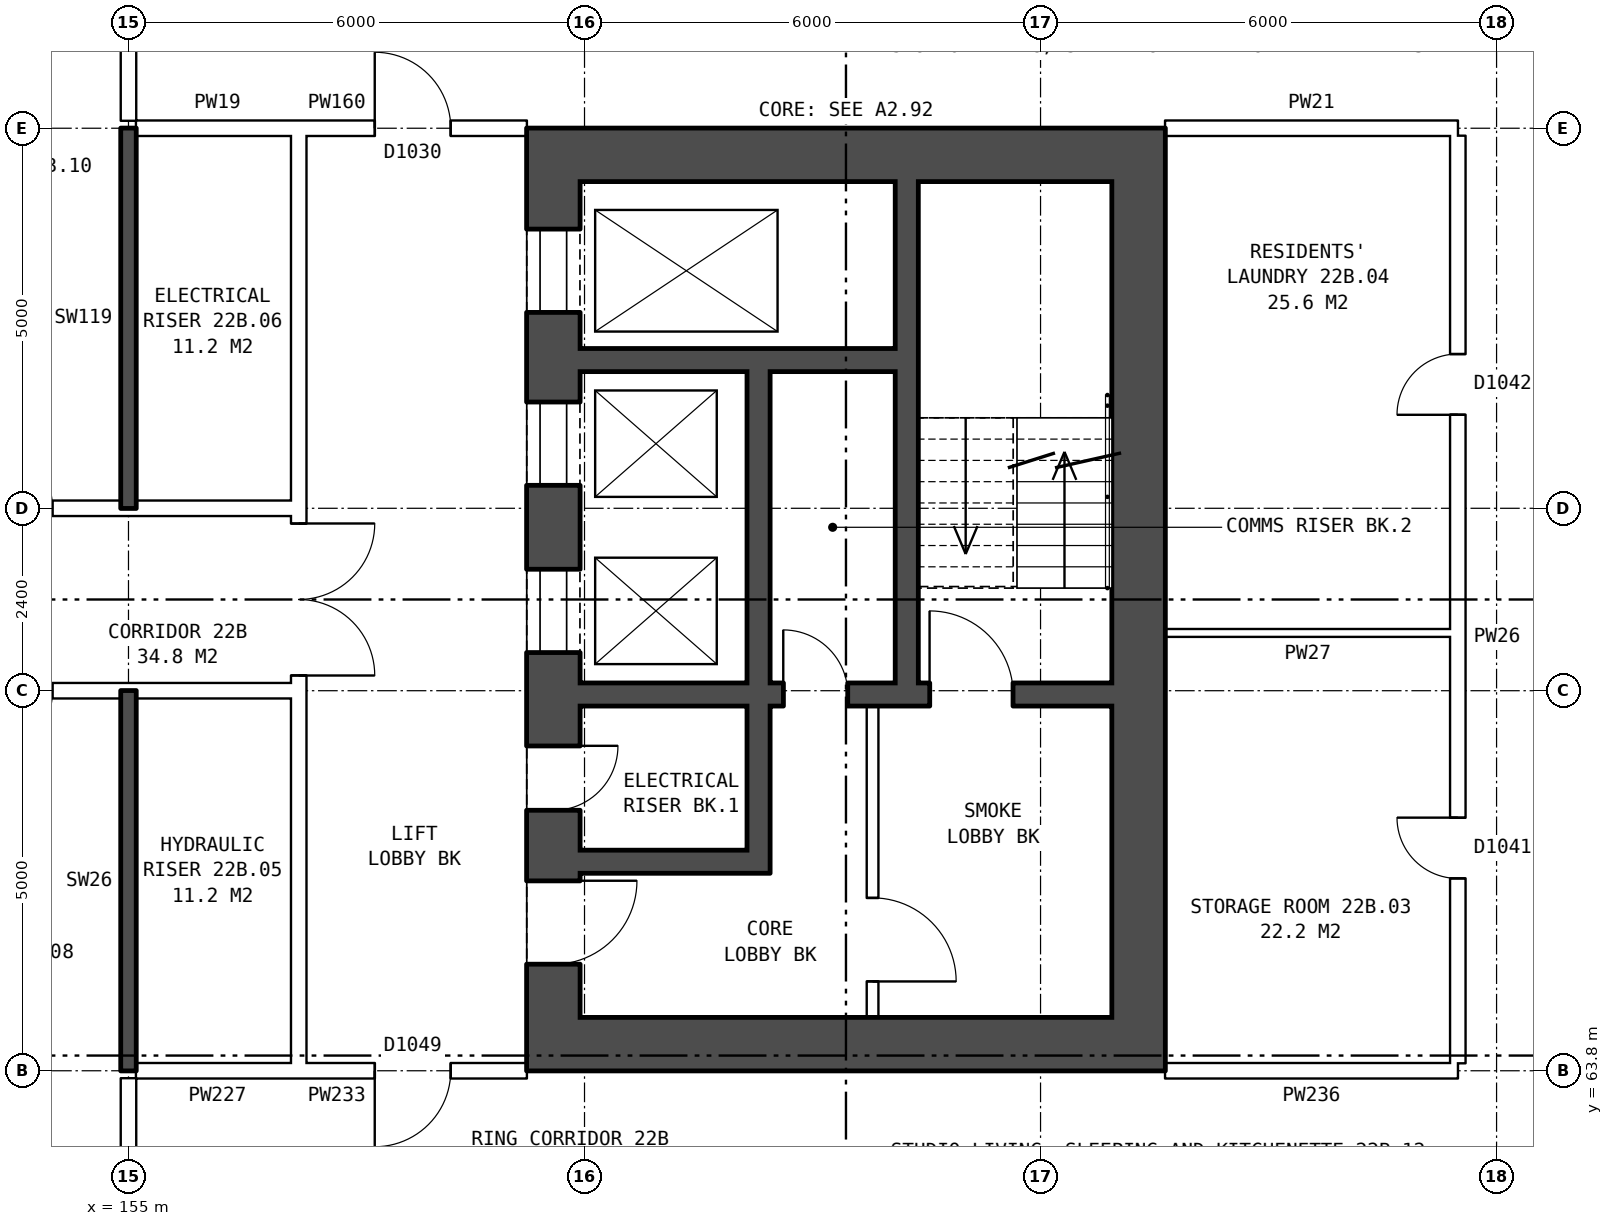
"""IFC4 building model, lengths in metres.
Left out: names, types, materials, properties, quantities, classifications, styles, units other than length and angle.
Written with IfcOpenShell. Run it as: python <this file> out.ifc"""

import sys

from ifc_helpers import new_model, si_unit, direction, frame, frame_2d, origin, place, context, subcontext, project, spatial, rectangle, extrude, element, fill, save


model = new_model("IFC4")
c1 = context("Model", 3, precision=1e-05, world=origin(), true_north=direction((0.0, 1.0)))
c2 = subcontext(c1, "Body", "Model", "MODEL_VIEW")
j1 = project(units=[si_unit("LENGTHUNIT", "METRE"), si_unit("PLANEANGLEUNIT", "RADIAN")], contexts=[c1])
p1 = place(None, origin())
s1 = spatial("IfcSite", under=j1, at=p1, CompositionType="ELEMENT")
p2 = place(p1, origin())
s2 = spatial("IfcBuilding", under=s1, at=p2, CompositionType="ELEMENT")
p3 = place(p2, frame((0.0, 0.0, 80.9)))
s3 = spatial("IfcBuildingStorey", under=s2, at=p3, CompositionType="ELEMENT", Elevation=80.9)
p4 = place(p3, frame((160.59, 75.5, 0.0), z_axis=(0.0, 0.0, 1.0), x_axis=(0.0, -1.0, 0.0)))
e1 = element("IfcWall", 1, at=p4, inside=s3, PredefinedType="SHEAR", context=c2, shape_type="SweptSolid", body=[
    extrude(rectangle(XDim=11.0, YDim=0.7, at=frame_2d((5.5, 0.0))), origin(), (0.0, 0.0, 1.0), 2.85),
])
p5 = place(p4, frame((0.625, 0.0, 0.0)))
e2 = element("IfcOpeningElement", 2, at=p5, cuts=e1, PredefinedType="OPENING", context=c2, shape_type="SweptSolid", body=[
    extrude(rectangle(XDim=1.1, YDim=2.1, at=frame_2d((0.55, 1.05))), frame((0.0, 0.36, 0.0), z_axis=(0.0, -1.0, 0.0), x_axis=(1.0, 0.0, 0.0)), (0.0, 0.0, 1.0), 0.72),
])
p6 = place(p4, frame((2.9, 0.0, 0.0)))
e3 = element("IfcOpeningElement", 3, at=p6, cuts=e1, PredefinedType="OPENING", context=c2, shape_type="SweptSolid", body=[
    extrude(rectangle(XDim=1.1, YDim=2.1, at=frame_2d((0.55, 1.05))), frame((0.0, 0.36, 0.0), z_axis=(0.0, -1.0, 0.0), x_axis=(1.0, 0.0, 0.0)), (0.0, 0.0, 1.0), 0.72),
])
p7 = place(p4, frame((5.1, 0.0, 0.0)))
e4 = element("IfcOpeningElement", 4, at=p7, cuts=e1, PredefinedType="OPENING", context=c2, shape_type="SweptSolid", body=[
    extrude(rectangle(XDim=1.1, YDim=2.1, at=frame_2d((0.55, 1.05))), frame((0.0, 0.36, 0.0), z_axis=(0.0, -1.0, 0.0), x_axis=(1.0, 0.0, 0.0)), (0.0, 0.0, 1.0), 0.72),
])
p8 = place(p4, frame((9.2, 0.0, 0.0)))
e5 = element("IfcOpeningElement", 5, at=p8, cuts=e1, PredefinedType="OPENING", context=c2, shape_type="SweptSolid", body=[
    extrude(rectangle(XDim=1.1, YDim=2.1, at=frame_2d((0.55, 1.05))), frame((0.0, 0.36, 0.0), z_axis=(0.0, -1.0, 0.0), x_axis=(1.0, 0.0, 0.0)), (0.0, 0.0, 1.0), 0.72),
])
p9 = place(p4, frame((7.425, 0.0, 0.0)))
e6 = element("IfcOpeningElement", 6, at=p9, cuts=e1, PredefinedType="OPENING", context=c2, shape_type="SweptSolid", body=[
    extrude(rectangle(XDim=0.85, YDim=2.1, at=frame_2d((0.425, 1.05))), frame((0.0, 0.36, 0.0), z_axis=(0.0, -1.0, 0.0), x_axis=(1.0, 0.0, 0.0)), (0.0, 0.0, 1.0), 0.72),
])
p10 = place(p3, frame((168.29, 75.5, 0.0), z_axis=(0.0, 0.0, 1.0), x_axis=(0.0, -1.0, 0.0)))
e7 = element("IfcWall", 7, at=p10, inside=s3, PredefinedType="SHEAR", context=c2, shape_type="SweptSolid", body=[
    extrude(rectangle(XDim=11.0, YDim=0.7, at=frame_2d((5.5, 0.0))), origin(), (0.0, 0.0, 1.0), 2.85),
])
for number, where, z_axis, x_axis in (
    (8, (160.24, 75.85, 0.0), (0.0, 0.0, 1.0), (1.0, 0.0, 0.0)),
    (9, (160.24, 64.15, 0.0), (0.0, 0.0, 1.0), (1.0, 0.0, 0.0)),
):
    element("IfcWall", number, at=place(p3, frame(where, z_axis=z_axis, x_axis=x_axis)), inside=s3, PredefinedType="SHEAR", context=c2, shape_type="SweptSolid", body=[
        extrude(rectangle(XDim=8.4, YDim=0.7, at=frame_2d((4.2, 0.0))), origin(), (0.0, 0.0, 1.0), 2.85),
    ])
p11 = place(p3, frame((160.94, 73.15, 0.0), z_axis=(0.0, 0.0, 1.0), x_axis=(1.0, 0.0, 0.0)))
e10 = element("IfcWall", 10, at=p11, inside=s3, PredefinedType="SHEAR", context=c2, shape_type="SweptSolid", body=[
    extrude(rectangle(XDim=4.15, YDim=0.3, at=frame_2d((2.075, 0.0))), origin(), (0.0, 0.0, 1.0), 2.85),
])
p12 = place(p3, frame((160.94, 68.75, 0.0), z_axis=(0.0, 0.0, 1.0), x_axis=(1.0, 0.0, 0.0)))
e11 = element("IfcWall", 11, at=p12, inside=s3, PredefinedType="SHEAR", context=c2, shape_type="SweptSolid", body=[
    extrude(rectangle(XDim=7.0, YDim=0.3, at=frame_2d((3.5, 0.0))), origin(), (0.0, 0.0, 1.0), 2.85),
])
p13 = place(p12, frame((4.6, 0.0, 0.0)))
e12 = element("IfcOpeningElement", 12, at=p13, cuts=e11, PredefinedType="OPENING", context=c2, shape_type="SweptSolid", body=[
    extrude(rectangle(XDim=1.1, YDim=2.1, at=frame_2d((0.55, 1.05))), frame((0.0, 0.16, 0.0), z_axis=(0.0, -1.0, 0.0), x_axis=(1.0, 0.0, 0.0)), (0.0, 0.0, 1.0), 0.32),
])
p14 = place(p12, frame((2.675, 0.0, 0.0)))
e13 = element("IfcOpeningElement", 13, at=p14, cuts=e11, PredefinedType="OPENING", context=c2, shape_type="SweptSolid", body=[
    extrude(rectangle(XDim=0.85, YDim=2.1, at=frame_2d((0.425, 1.05))), frame((0.0, 0.16, 0.0), z_axis=(0.0, -1.0, 0.0), x_axis=(1.0, 0.0, 0.0)), (0.0, 0.0, 1.0), 0.32),
])
p15 = place(p3, frame((160.94, 66.55, 0.0), z_axis=(0.0, 0.0, 1.0), x_axis=(1.0, 0.0, 0.0)))
e14 = element("IfcWall", 14, at=p15, inside=s3, PredefinedType="SHEAR", context=c2, shape_type="SweptSolid", body=[
    extrude(rectangle(XDim=2.2, YDim=0.3, at=frame_2d((1.1, 0.0))), origin(), (0.0, 0.0, 1.0), 2.85),
])
p16 = place(p3, frame((163.29, 73.0, 0.0), z_axis=(0.0, 0.0, 1.0), x_axis=(0.0, -1.0, 0.0)))
e15 = element("IfcWall", 15, at=p16, inside=s3, PredefinedType="SHEAR", context=c2, shape_type="SweptSolid", body=[
    extrude(rectangle(XDim=4.1, YDim=0.3, at=frame_2d((2.05, 0.0))), origin(), (0.0, 0.0, 1.0), 2.85),
])
p17 = place(p3, frame((163.29, 68.6, 0.0), z_axis=(0.0, 0.0, 1.0), x_axis=(0.0, -1.0, 0.0)))
e16 = element("IfcWall", 16, at=p17, inside=s3, PredefinedType="SHEAR", context=c2, shape_type="SweptSolid", body=[
    extrude(rectangle(XDim=2.2, YDim=0.3, at=frame_2d((1.1, 0.0))), origin(), (0.0, 0.0, 1.0), 2.85),
])
p18 = place(p3, frame((164.79, 68.6, 0.0), z_axis=(0.0, 0.0, 1.0), x_axis=(0.0, -1.0, 0.0)))
e17 = element("IfcWall", 17, at=p18, inside=s3, PredefinedType="PARTITIONING", context=c2, shape_type="SweptSolid", body=[
    extrude(rectangle(XDim=4.1, YDim=0.15, at=frame_2d((2.05, 0.0))), origin(), (0.0, 0.0, 1.0), 2.85),
])
p19 = place(p18, frame((2.525, 0.0, 0.0)))
e18 = element("IfcOpeningElement", 18, at=p19, cuts=e17, PredefinedType="OPENING", context=c2, shape_type="SweptSolid", body=[
    extrude(rectangle(XDim=1.1, YDim=2.1, at=frame_2d((0.55, 1.05))), frame((0.0, 0.085, 0.0), z_axis=(0.0, -1.0, 0.0), x_axis=(1.0, 0.0, 0.0)), (0.0, 0.0, 1.0), 0.17),
])
p20 = place(p3, frame((165.24, 75.5, 0.0), z_axis=(0.0, 0.0, 1.0), x_axis=(0.0, -1.0, 0.0)))
e19 = element("IfcWall", 19, at=p20, inside=s3, PredefinedType="SHEAR", context=c2, shape_type="SweptSolid", body=[
    extrude(rectangle(XDim=6.6, YDim=0.3, at=frame_2d((3.3, 0.0))), origin(), (0.0, 0.0, 1.0), 2.85),
])
p21 = place(p3, frame((157.24, 63.9, 0.0), z_axis=(0.0, 0.0, 1.0), x_axis=(0.0, 1.0, 0.0)))
e20 = element("IfcWall", 20, at=p21, inside=s3, PredefinedType="PARTITIONING", context=c2, shape_type="SweptSolid", body=[
    extrude(rectangle(XDim=12.2, YDim=0.2, at=frame_2d((6.1, 0.0))), origin(), (0.0, 0.0, 1.0), 2.85),
])
p22 = place(p21, frame((5.1, 0.0, 0.0)))
e21 = element("IfcOpeningElement", 21, at=p22, cuts=e20, PredefinedType="OPENING", context=c2, shape_type="SweptSolid", body=[
    extrude(rectangle(XDim=2.0, YDim=2.1, at=frame_2d((1.0, 1.05))), frame((0.0, 0.11, 0.0), z_axis=(0.0, -1.0, 0.0), x_axis=(1.0, 0.0, 0.0)), (0.0, 0.0, 1.0), 0.22),
])
p23 = place(p3, frame((155.1, 63.8, 0.0), z_axis=(0.0, 0.0, 1.0), x_axis=(1.0, 0.0, 0.0)))
e22 = element("IfcWall", 22, at=p23, inside=s3, PredefinedType="PARTITIONING", context=c2, shape_type="SweptSolid", body=[
    extrude(rectangle(XDim=2.14, YDim=0.2, at=frame_2d((1.07, 0.0))), origin(), (0.0, 0.0, 1.0), 2.85),
])
p24 = place(p3, frame((157.24, 63.8, 0.0), z_axis=(0.0, 0.0, 1.0), x_axis=(1.0, 0.0, 0.0)))
e23 = element("IfcWall", 23, at=p24, inside=s3, PredefinedType="PARTITIONING", context=c2, shape_type="SweptSolid", body=[
    extrude(rectangle(XDim=3.0, YDim=0.2, at=frame_2d((1.5, 0.0))), origin(), (0.0, 0.0, 1.0), 2.85),
])
p25 = place(p24, frame((1.0, 0.0, 0.0)))
e24 = element("IfcOpeningElement", 24, at=p25, cuts=e23, PredefinedType="OPENING", context=c2, shape_type="SweptSolid", body=[
    extrude(rectangle(XDim=1.0, YDim=2.1, at=frame_2d((0.5, 1.05))), frame((0.0, 0.11, 0.0), z_axis=(0.0, -1.0, 0.0), x_axis=(1.0, 0.0, 0.0)), (0.0, 0.0, 1.0), 0.22),
])
p26 = place(p3, frame((168.64, 63.8, 0.0), z_axis=(0.0, 0.0, 1.0), x_axis=(1.0, 0.0, 0.0)))
e25 = element("IfcWall", 25, at=p26, inside=s3, PredefinedType="PARTITIONING", context=c2, shape_type="SweptSolid", body=[
    extrude(rectangle(XDim=3.85, YDim=0.2, at=frame_2d((1.925, 0.0))), origin(), (0.0, 0.0, 1.0), 2.85),
])
p27 = place(p3, frame((142.76, 68.8, 0.0), z_axis=(0.0, 0.0, 1.0), x_axis=(1.0, 0.0, 0.0)))
e26 = element("IfcWall", 26, at=p27, inside=s3, PredefinedType="PARTITIONING", context=c2, shape_type="SweptSolid", body=[
    extrude(rectangle(XDim=14.48, YDim=0.2, at=frame_2d((7.24, 0.0))), origin(), (0.0, 0.0, 1.0), 2.85),
])
p28 = place(p27, frame((4.24, 0.0, 0.0)))
e27 = element("IfcOpeningElement", 27, at=p28, cuts=e26, PredefinedType="OPENING", context=c2, shape_type="SweptSolid", body=[
    extrude(rectangle(XDim=1.0, YDim=2.1, at=frame_2d((0.5, 1.05))), frame((0.0, 0.11, 0.0), z_axis=(0.0, -1.0, 0.0), x_axis=(1.0, 0.0, 0.0)), (0.0, 0.0, 1.0), 0.22),
])
p29 = place(p27, frame((10.24, 0.0, 0.0)))
e28 = element("IfcOpeningElement", 28, at=p29, cuts=e26, PredefinedType="OPENING", context=c2, shape_type="SweptSolid", body=[
    extrude(rectangle(XDim=1.0, YDim=2.1, at=frame_2d((0.5, 1.05))), frame((0.0, 0.11, 0.0), z_axis=(0.0, -1.0, 0.0), x_axis=(1.0, 0.0, 0.0)), (0.0, 0.0, 1.0), 0.22),
])
p30 = place(p3, frame((168.64, 69.56, 0.0), z_axis=(0.0, 0.0, 1.0), x_axis=(1.0, 0.0, 0.0)))
e29 = element("IfcWall", 29, at=p30, inside=s3, PredefinedType="PARTITIONING", context=c2, shape_type="SweptSolid", body=[
    extrude(rectangle(XDim=3.75, YDim=0.1, at=frame_2d((1.875, 0.0))), origin(), (0.0, 0.0, 1.0), 2.85),
])
p31 = place(p3, frame((142.76, 71.2, 0.0), z_axis=(0.0, 0.0, 1.0), x_axis=(1.0, 0.0, 0.0)))
e30 = element("IfcWall", 30, at=p31, inside=s3, PredefinedType="PARTITIONING", context=c2, shape_type="SweptSolid", body=[
    extrude(rectangle(XDim=14.48, YDim=0.2, at=frame_2d((7.24, 0.0))), origin(), (0.0, 0.0, 1.0), 2.85),
])
p32 = place(p31, frame((1.12, 0.0, 0.0)))
e31 = element("IfcOpeningElement", 31, at=p32, cuts=e30, PredefinedType="OPENING", context=c2, shape_type="SweptSolid", body=[
    extrude(rectangle(XDim=1.0, YDim=2.1, at=frame_2d((0.5, 1.05))), frame((0.0, 0.11, 0.0), z_axis=(0.0, -1.0, 0.0), x_axis=(1.0, 0.0, 0.0)), (0.0, 0.0, 1.0), 0.22),
])
p33 = place(p31, frame((10.24, 0.0, 0.0)))
e32 = element("IfcOpeningElement", 32, at=p33, cuts=e30, PredefinedType="OPENING", context=c2, shape_type="SweptSolid", body=[
    extrude(rectangle(XDim=1.0, YDim=2.1, at=frame_2d((0.5, 1.05))), frame((0.0, 0.11, 0.0), z_axis=(0.0, -1.0, 0.0), x_axis=(1.0, 0.0, 0.0)), (0.0, 0.0, 1.0), 0.22),
])
p34 = place(p3, frame((155.1, 76.2, 0.0), z_axis=(0.0, 0.0, 1.0), x_axis=(1.0, 0.0, 0.0)))
e33 = element("IfcWall", 33, at=p34, inside=s3, PredefinedType="PARTITIONING", context=c2, shape_type="SweptSolid", body=[
    extrude(rectangle(XDim=2.14, YDim=0.2, at=frame_2d((1.07, 0.0))), origin(), (0.0, 0.0, 1.0), 2.85),
])
p35 = place(p3, frame((157.24, 76.2, 0.0), z_axis=(0.0, 0.0, 1.0), x_axis=(1.0, 0.0, 0.0)))
e34 = element("IfcWall", 34, at=p35, inside=s3, PredefinedType="PARTITIONING", context=c2, shape_type="SweptSolid", body=[
    extrude(rectangle(XDim=3.0, YDim=0.2, at=frame_2d((1.5, 0.0))), origin(), (0.0, 0.0, 1.0), 2.85),
])
p36 = place(p35, frame((1.0, 0.0, 0.0)))
e35 = element("IfcOpeningElement", 35, at=p36, cuts=e34, PredefinedType="OPENING", context=c2, shape_type="SweptSolid", body=[
    extrude(rectangle(XDim=1.0, YDim=2.1, at=frame_2d((0.5, 1.05))), frame((0.0, 0.11, 0.0), z_axis=(0.0, -1.0, 0.0), x_axis=(1.0, 0.0, 0.0)), (0.0, 0.0, 1.0), 0.22),
])
p37 = place(p3, frame((168.64, 76.2, 0.0), z_axis=(0.0, 0.0, 1.0), x_axis=(1.0, 0.0, 0.0)))
e36 = element("IfcWall", 36, at=p37, inside=s3, PredefinedType="PARTITIONING", context=c2, shape_type="SweptSolid", body=[
    extrude(rectangle(XDim=3.85, YDim=0.2, at=frame_2d((1.925, 0.0))), origin(), (0.0, 0.0, 1.0), 2.85),
])
p38 = place(p3, frame((155.0, 61.5, 0.0), z_axis=(0.0, 0.0, 1.0), x_axis=(0.0, 1.0, 0.0)))
e37 = element("IfcWall", 37, at=p38, inside=s3, PredefinedType="PARTITIONING", context=c2, shape_type="SweptSolid", body=[
    extrude(rectangle(XDim=2.2, YDim=0.2, at=frame_2d((1.1, 0.0))), origin(), (0.0, 0.0, 1.0), 2.85),
])
for number, where, z_axis, x_axis in (
    (38, (155.0, 63.8, 0.0), (0.0, 0.0, 1.0), (0.0, 1.0, 0.0)),
    (39, (155.0, 71.2, 0.0), (0.0, 0.0, 1.0), (0.0, 1.0, 0.0)),
):
    element("IfcWall", number, at=place(p3, frame(where, z_axis=z_axis, x_axis=x_axis)), inside=s3, PredefinedType="SOLIDWALL", context=c2, shape_type="SweptSolid", body=[
        extrude(rectangle(XDim=5.0, YDim=0.2, at=frame_2d((2.5, 0.0))), origin(), (0.0, 0.0, 1.0), 2.85),
    ])
p39 = place(p3, frame((155.0, 76.3, 0.0), z_axis=(0.0, 0.0, 1.0), x_axis=(0.0, 1.0, 0.0)))
e40 = element("IfcWall", 40, at=p39, inside=s3, PredefinedType="PARTITIONING", context=c2, shape_type="SweptSolid", body=[
    extrude(rectangle(XDim=2.2, YDim=0.2, at=frame_2d((1.1, 0.0))), origin(), (0.0, 0.0, 1.0), 2.85),
])
p40 = place(p3, frame((172.49, 63.9, 0.0), z_axis=(0.0, 0.0, 1.0), x_axis=(0.0, 1.0, 0.0)))
e41 = element("IfcWall", 41, at=p40, inside=s3, PredefinedType="PARTITIONING", context=c2, shape_type="SweptSolid", body=[
    extrude(rectangle(XDim=12.2, YDim=0.2, at=frame_2d((6.1, 0.0))), origin(), (0.0, 0.0, 1.0), 2.85),
])
p41 = place(p40, frame((2.43, 0.0, 0.0)))
e42 = element("IfcOpeningElement", 42, at=p41, cuts=e41, PredefinedType="OPENING", context=c2, shape_type="SweptSolid", body=[
    extrude(rectangle(XDim=0.8, YDim=2.1, at=frame_2d((0.4, 1.05))), frame((0.0, 0.11, 0.0), z_axis=(0.0, -1.0, 0.0), x_axis=(1.0, 0.0, 0.0)), (0.0, 0.0, 1.0), 0.22),
])
p42 = place(p40, frame((8.53, 0.0, 0.0)))
e43 = element("IfcOpeningElement", 43, at=p42, cuts=e41, PredefinedType="OPENING", context=c2, shape_type="SweptSolid", body=[
    extrude(rectangle(XDim=0.8, YDim=2.1, at=frame_2d((0.4, 1.05))), frame((0.0, 0.11, 0.0), z_axis=(0.0, -1.0, 0.0), x_axis=(1.0, 0.0, 0.0)), (0.0, 0.0, 1.0), 0.22),
])
p43 = place(p5, origin())
e44 = element("IfcDoor", 44, at=p43, inside=s3, OperationType="DOUBLE_DOOR_SLIDING", PredefinedType="DOOR", context=c2, shape_type="SweptSolid", body=[
    extrude(rectangle(XDim=1.1, YDim=2.1, at=frame_2d((0.55, 1.05))), frame((0.0, 0.335, 0.0), z_axis=(0.0, -1.0, 0.0), x_axis=(1.0, 0.0, 0.0)), (0.0, 0.0, 1.0), 0.05),
])
fill(e2, e44)
p44 = place(p6, origin())
e45 = element("IfcDoor", 45, at=p44, inside=s3, OperationType="DOUBLE_DOOR_SLIDING", PredefinedType="DOOR", context=c2, shape_type="SweptSolid", body=[
    extrude(rectangle(XDim=1.1, YDim=2.1, at=frame_2d((0.55, 1.05))), frame((0.0, 0.335, 0.0), z_axis=(0.0, -1.0, 0.0), x_axis=(1.0, 0.0, 0.0)), (0.0, 0.0, 1.0), 0.05),
])
fill(e3, e45)
p45 = place(p7, origin())
e46 = element("IfcDoor", 46, at=p45, inside=s3, OperationType="DOUBLE_DOOR_SLIDING", PredefinedType="DOOR", context=c2, shape_type="SweptSolid", body=[
    extrude(rectangle(XDim=1.1, YDim=2.1, at=frame_2d((0.55, 1.05))), frame((0.0, 0.335, 0.0), z_axis=(0.0, -1.0, 0.0), x_axis=(1.0, 0.0, 0.0)), (0.0, 0.0, 1.0), 0.05),
])
fill(e4, e46)
p46 = place(p8, origin())
e47 = element("IfcDoor", 47, at=p46, inside=s3, OperationType="SINGLE_SWING_LEFT", PredefinedType="DOOR", context=c2, shape_type="SweptSolid", body=[
    extrude(rectangle(XDim=1.1, YDim=2.1, at=frame_2d((0.55, 1.05))), frame((0.0, 0.335, 0.0), z_axis=(0.0, -1.0, 0.0), x_axis=(1.0, 0.0, 0.0)), (0.0, 0.0, 1.0), 0.05),
])
fill(e5, e47)
p47 = place(p19, origin())
e48 = element("IfcDoor", 48, at=p47, inside=s3, OperationType="SINGLE_SWING_RIGHT", PredefinedType="DOOR", context=c2, shape_type="SweptSolid", body=[
    extrude(rectangle(XDim=1.1, YDim=2.1, at=frame_2d((0.55, 1.05))), frame((0.0, 0.025, 0.0), z_axis=(0.0, -1.0, 0.0), x_axis=(1.0, 0.0, 0.0)), (0.0, 0.0, 1.0), 0.05),
])
fill(e18, e48)
p48 = place(p13, origin())
e49 = element("IfcDoor", 49, at=p48, inside=s3, OperationType="SINGLE_SWING_LEFT", PredefinedType="DOOR", context=c2, shape_type="SweptSolid", body=[
    extrude(rectangle(XDim=1.1, YDim=2.1, at=frame_2d((0.55, 1.05))), frame((0.0, 0.025, 0.0), z_axis=(0.0, -1.0, 0.0), x_axis=(1.0, 0.0, 0.0)), (0.0, 0.0, 1.0), 0.05),
])
fill(e12, e49)
p49 = place(p9, origin())
e50 = element("IfcDoor", 50, at=p49, inside=s3, OperationType="SINGLE_SWING_LEFT", PredefinedType="DOOR", context=c2, shape_type="SweptSolid", body=[
    extrude(rectangle(XDim=0.85, YDim=2.1, at=frame_2d((0.425, 1.05))), frame((0.0, 0.335, 0.0), z_axis=(0.0, -1.0, 0.0), x_axis=(1.0, 0.0, 0.0)), (0.0, 0.0, 1.0), 0.05),
])
fill(e6, e50)
p50 = place(p14, origin())
e51 = element("IfcDoor", 51, at=p50, inside=s3, OperationType="SINGLE_SWING_LEFT", PredefinedType="DOOR", context=c2, shape_type="SweptSolid", body=[
    extrude(rectangle(XDim=0.85, YDim=2.1, at=frame_2d((0.425, 1.05))), frame((0.0, 0.025, 0.0), z_axis=(0.0, -1.0, 0.0), x_axis=(1.0, 0.0, 0.0)), (0.0, 0.0, 1.0), 0.05),
])
fill(e13, e51)
p51 = place(p22, frame((2.0, 0.0, 0.0), z_axis=(0.0, 0.0, 1.0), x_axis=(-1.0, 0.0, 0.0)))
e52 = element("IfcDoor", 52, at=p51, inside=s3, OperationType="DOUBLE_DOOR_SINGLE_SWING", PredefinedType="DOOR", context=c2, shape_type="SweptSolid", body=[
    extrude(rectangle(XDim=2.0, YDim=2.1, at=frame_2d((1.0, 1.05))), frame((0.0, 0.025, 0.0), z_axis=(0.0, -1.0, 0.0), x_axis=(1.0, 0.0, 0.0)), (0.0, 0.0, 1.0), 0.05),
])
fill(e21, e52)
p52 = place(p25, frame((1.0, 0.0, 0.0), z_axis=(0.0, 0.0, 1.0), x_axis=(-1.0, 0.0, 0.0)))
e53 = element("IfcDoor", 53, at=p52, inside=s3, OperationType="SINGLE_SWING_RIGHT", PredefinedType="DOOR", context=c2, shape_type="SweptSolid", body=[
    extrude(rectangle(XDim=1.0, YDim=2.1, at=frame_2d((0.5, 1.05))), frame((0.0, 0.025, 0.0), z_axis=(0.0, -1.0, 0.0), x_axis=(1.0, 0.0, 0.0)), (0.0, 0.0, 1.0), 0.05),
])
fill(e24, e53)
p53 = place(p36, origin())
e54 = element("IfcDoor", 54, at=p53, inside=s3, OperationType="SINGLE_SWING_LEFT", PredefinedType="DOOR", context=c2, shape_type="SweptSolid", body=[
    extrude(rectangle(XDim=1.0, YDim=2.1, at=frame_2d((0.5, 1.05))), frame((0.0, 0.025, 0.0), z_axis=(0.0, -1.0, 0.0), x_axis=(1.0, 0.0, 0.0)), (0.0, 0.0, 1.0), 0.05),
])
fill(e35, e54)
p54 = place(p41, origin())
e55 = element("IfcDoor", 55, at=p54, inside=s3, OperationType="SINGLE_SWING_RIGHT", PredefinedType="DOOR", context=c2, shape_type="SweptSolid", body=[
    extrude(rectangle(XDim=0.8, YDim=2.1, at=frame_2d((0.4, 1.05))), frame((0.0, 0.025, 0.0), z_axis=(0.0, -1.0, 0.0), x_axis=(1.0, 0.0, 0.0)), (0.0, 0.0, 1.0), 0.05),
])
fill(e42, e55)
p55 = place(p42, origin())
e56 = element("IfcDoor", 56, at=p55, inside=s3, OperationType="SINGLE_SWING_LEFT", PredefinedType="DOOR", context=c2, shape_type="SweptSolid", body=[
    extrude(rectangle(XDim=0.8, YDim=2.1, at=frame_2d((0.4, 1.05))), frame((0.0, 0.025, 0.0), z_axis=(0.0, -1.0, 0.0), x_axis=(1.0, 0.0, 0.0)), (0.0, 0.0, 1.0), 0.05),
])
fill(e43, e56)
save(model, sys.argv[1])
